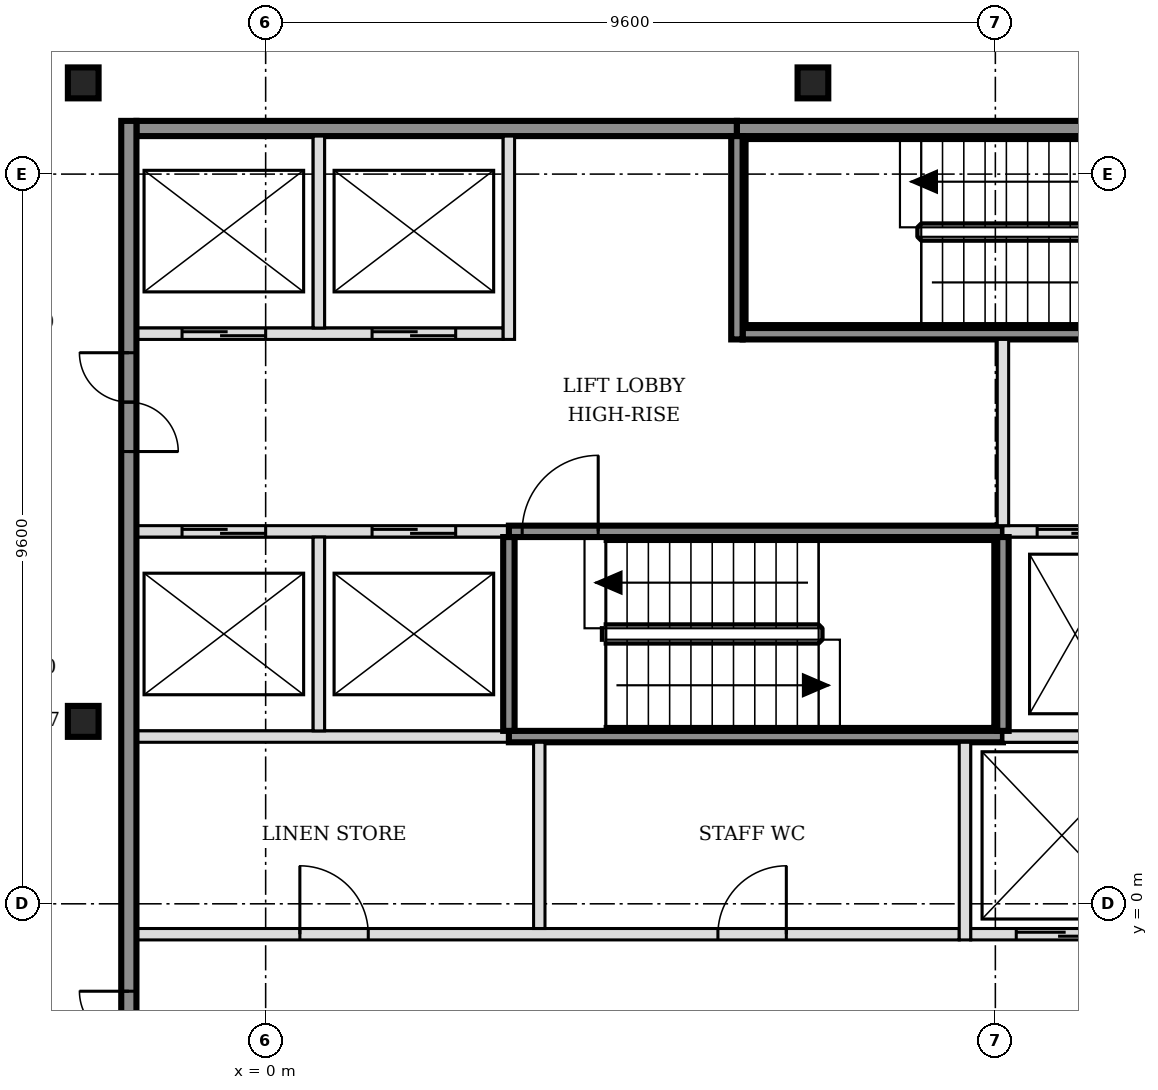
"""IFC4 building model, lengths in metres.
Left out: names, types, materials, properties, quantities, classifications, styles, units other than length and angle.
Written with IfcOpenShell. Run it as: python <this file> out.ifc"""

import sys

from ifc_helpers import new_model, si_unit, direction, frame, frame_2d, origin, origin_2d, place, context, subcontext, project, spatial, rectangle, i_section, extrude, element, fill, save


model = new_model("IFC4")
c1 = context("Model", 3, precision=1e-05, world=origin(), true_north=direction((0.0, 1.0)))
c2 = subcontext(c1, "Body", "Model", "MODEL_VIEW")
j1 = project(units=[si_unit("LENGTHUNIT", "METRE"), si_unit("PLANEANGLEUNIT", "RADIAN")], contexts=[c1])
p1 = place(None, origin())
s1 = spatial("IfcSite", under=j1, at=p1, CompositionType="ELEMENT")
p2 = place(p1, origin())
s2 = spatial("IfcBuilding", under=s1, at=p2, CompositionType="ELEMENT")
p3 = place(p2, frame((0.0, 0.0, 225.0)))
s3 = spatial("IfcBuildingStorey", under=s2, at=p3, CompositionType="ELEMENT", Elevation=225.0)
for number, where, z_axis, x_axis in (
    (1, (-2.4, 2.4, -0.15), (0.0, 0.0, 1.0), (1.0, 0.0, 0.0)),
    (2, (-2.4, 10.8, -0.15), (0.0, 0.0, 1.0), (1.0, 0.0, 0.0)),
    (3, (7.2, 10.8, -0.15), (0.0, 0.0, 1.0), (1.0, 0.0, 0.0)),
):
    element("IfcColumn", number, at=place(p3, frame(where, z_axis=z_axis, x_axis=x_axis)), inside=s3, PredefinedType="COLUMN", context=c2, shape_type="SweptSolid", body=[
        extrude(i_section(OverallWidth=0.404, OverallDepth=0.407, WebThickness=0.027, FlangeThickness=0.044, FilletRadius=0.015, at=origin_2d()), origin(), (0.0, 0.0, 1.0), 3.6),
    ])
p4 = place(p3, frame((-1.7, -0.4, 0.0), z_axis=(0.0, 0.0, 1.0), x_axis=(1.0, 0.0, 0.0)))
e4 = element("IfcWall", 4, at=p4, inside=s3, PredefinedType="PARTITIONING", context=c2, shape_type="SweptSolid", body=[
    extrude(rectangle(XDim=10.825, YDim=0.15, at=frame_2d((5.413, 0.0))), origin(), (0.0, 0.0, 1.0), 3.45),
])
p5 = place(p4, frame((2.15, 0.0, 0.0)))
e5 = element("IfcOpeningElement", 5, at=p5, cuts=e4, PredefinedType="OPENING", context=c2, shape_type="SweptSolid", body=[
    extrude(rectangle(XDim=0.9, YDim=2.1, at=frame_2d((0.45, 1.05))), frame((0.0, 0.085, 0.0), z_axis=(0.0, -1.0, 0.0), x_axis=(1.0, 0.0, 0.0)), (0.0, 0.0, 1.0), 0.17),
])
p6 = place(p4, frame((7.65, 0.0, 0.0)))
e6 = element("IfcOpeningElement", 6, at=p6, cuts=e4, PredefinedType="OPENING", context=c2, shape_type="SweptSolid", body=[
    extrude(rectangle(XDim=0.9, YDim=2.1, at=frame_2d((0.45, 1.05))), frame((0.0, 0.085, 0.0), z_axis=(0.0, -1.0, 0.0), x_axis=(1.0, 0.0, 0.0)), (0.0, 0.0, 1.0), 0.17),
])
p7 = place(p3, frame((9.275, -0.4, 0.0), z_axis=(0.0, 0.0, 1.0), x_axis=(1.0, 0.0, 0.0)))
e7 = element("IfcWall", 7, at=p7, inside=s3, PredefinedType="SOLIDWALL", context=c2, shape_type="SweptSolid", body=[
    extrude(rectangle(XDim=4.95, YDim=0.15, at=frame_2d((2.475, 0.0))), origin(), (0.0, 0.0, 1.0), 3.45),
])
p8 = place(p7, frame((0.6, 0.0, 0.0)))
e8 = element("IfcOpeningElement", 8, at=p8, cuts=e7, PredefinedType="OPENING", context=c2, shape_type="SweptSolid", body=[
    extrude(rectangle(XDim=1.2, YDim=2.1, at=frame_2d((0.6, 1.05))), frame((0.0, 0.085, 0.0), z_axis=(0.0, -1.0, 0.0), x_axis=(1.0, 0.0, 0.0)), (0.0, 0.0, 1.0), 0.17),
])
p9 = place(p7, frame((3.15, 0.0, 0.0)))
e9 = element("IfcOpeningElement", 9, at=p9, cuts=e7, PredefinedType="OPENING", context=c2, shape_type="SweptSolid", body=[
    extrude(rectangle(XDim=1.2, YDim=2.1, at=frame_2d((0.6, 1.05))), frame((0.0, 0.085, 0.0), z_axis=(0.0, -1.0, 0.0), x_axis=(1.0, 0.0, 0.0)), (0.0, 0.0, 1.0), 0.17),
])
p10 = place(p3, frame((-1.7, 2.2, 0.0), z_axis=(0.0, 0.0, 1.0), x_axis=(1.0, 0.0, 0.0)))
e10 = element("IfcWall", 10, at=p10, inside=s3, PredefinedType="SOLIDWALL", context=c2, shape_type="SweptSolid", body=[
    extrude(rectangle(XDim=4.9, YDim=0.15, at=frame_2d((2.45, 0.0))), origin(), (0.0, 0.0, 1.0), 3.45),
])
p11 = place(p3, frame((3.2, 2.2, 0.0), z_axis=(0.0, 0.0, 1.0), x_axis=(1.0, 0.0, 0.0)))
e11 = element("IfcWall", 11, at=p11, inside=s3, PredefinedType="SOLIDWALL", context=c2, shape_type="SweptSolid", body=[
    extrude(rectangle(XDim=6.5, YDim=0.15, at=frame_2d((3.25, 0.0))), origin(), (0.0, 0.0, 1.0), 3.45),
])
p12 = place(p3, frame((9.7, 2.2, 0.0), z_axis=(0.0, 0.0, 1.0), x_axis=(1.0, 0.0, 0.0)))
e12 = element("IfcWall", 12, at=p12, inside=s3, PredefinedType="SOLIDWALL", context=c2, shape_type="SweptSolid", body=[
    extrude(rectangle(XDim=4.525, YDim=0.15, at=frame_2d((2.263, 0.0))), origin(), (0.0, 0.0, 1.0), 3.45),
])
p13 = place(p3, frame((-1.7, 4.9, 0.0), z_axis=(0.0, 0.0, 1.0), x_axis=(1.0, 0.0, 0.0)))
e13 = element("IfcWall", 13, at=p13, inside=s3, PredefinedType="SOLIDWALL", context=c2, shape_type="SweptSolid", body=[
    extrude(rectangle(XDim=4.9, YDim=0.15, at=frame_2d((2.45, 0.0))), origin(), (0.0, 0.0, 1.0), 3.45),
])
p14 = place(p13, frame((0.6, 0.0, 0.0)))
e14 = element("IfcOpeningElement", 14, at=p14, cuts=e13, PredefinedType="OPENING", context=c2, shape_type="SweptSolid", body=[
    extrude(rectangle(XDim=1.1, YDim=2.1, at=frame_2d((0.55, 1.05))), frame((0.0, 0.085, 0.0), z_axis=(0.0, -1.0, 0.0), x_axis=(1.0, 0.0, 0.0)), (0.0, 0.0, 1.0), 0.17),
])
p15 = place(p13, frame((3.1, 0.0, 0.0)))
e15 = element("IfcOpeningElement", 15, at=p15, cuts=e13, PredefinedType="OPENING", context=c2, shape_type="SweptSolid", body=[
    extrude(rectangle(XDim=1.1, YDim=2.1, at=frame_2d((0.55, 1.05))), frame((0.0, 0.085, 0.0), z_axis=(0.0, -1.0, 0.0), x_axis=(1.0, 0.0, 0.0)), (0.0, 0.0, 1.0), 0.17),
])
p16 = place(p3, frame((3.2, 4.9, 0.0), z_axis=(0.0, 0.0, 1.0), x_axis=(1.0, 0.0, 0.0)))
e16 = element("IfcWall", 16, at=p16, inside=s3, PredefinedType="SOLIDWALL", context=c2, shape_type="SweptSolid", body=[
    extrude(rectangle(XDim=6.5, YDim=0.15, at=frame_2d((3.25, 0.0))), origin(), (0.0, 0.0, 1.0), 3.45),
])
p17 = place(p16, frame((0.175, 0.0, 0.0)))
e17 = element("IfcOpeningElement", 17, at=p17, cuts=e16, PredefinedType="OPENING", context=c2, shape_type="SweptSolid", body=[
    extrude(rectangle(XDim=1.0, YDim=2.1, at=frame_2d((0.5, 1.05))), frame((0.0, 0.085, 0.0), z_axis=(0.0, -1.0, 0.0), x_axis=(1.0, 0.0, 0.0)), (0.0, 0.0, 1.0), 0.17),
])
p18 = place(p3, frame((9.7, 4.9, 0.0), z_axis=(0.0, 0.0, 1.0), x_axis=(1.0, 0.0, 0.0)))
e18 = element("IfcWall", 18, at=p18, inside=s3, PredefinedType="SOLIDWALL", context=c2, shape_type="SweptSolid", body=[
    extrude(rectangle(XDim=6.4, YDim=0.15, at=frame_2d((3.2, 0.0))), origin(), (0.0, 0.0, 1.0), 3.45),
])
p19 = place(p18, frame((0.45, 0.0, 0.0)))
e19 = element("IfcOpeningElement", 19, at=p19, cuts=e18, PredefinedType="OPENING", context=c2, shape_type="SweptSolid", body=[
    extrude(rectangle(XDim=1.0, YDim=2.1, at=frame_2d((0.5, 1.05))), frame((0.0, 0.085, 0.0), z_axis=(0.0, -1.0, 0.0), x_axis=(1.0, 0.0, 0.0)), (0.0, 0.0, 1.0), 0.17),
])
p20 = place(p18, frame((2.35, 0.0, 0.0)))
e20 = element("IfcOpeningElement", 20, at=p20, cuts=e18, PredefinedType="OPENING", context=c2, shape_type="SweptSolid", body=[
    extrude(rectangle(XDim=1.0, YDim=2.1, at=frame_2d((0.5, 1.05))), frame((0.0, 0.085, 0.0), z_axis=(0.0, -1.0, 0.0), x_axis=(1.0, 0.0, 0.0)), (0.0, 0.0, 1.0), 0.17),
])
p21 = place(p18, frame((4.7, 0.0, 0.0)))
e21 = element("IfcOpeningElement", 21, at=p21, cuts=e18, PredefinedType="OPENING", context=c2, shape_type="SweptSolid", body=[
    extrude(rectangle(XDim=0.9, YDim=2.1, at=frame_2d((0.45, 1.05))), frame((0.0, 0.085, 0.0), z_axis=(0.0, -1.0, 0.0), x_axis=(1.0, 0.0, 0.0)), (0.0, 0.0, 1.0), 0.17),
])
p22 = place(p3, frame((-1.7, 7.5, 0.0), z_axis=(0.0, 0.0, 1.0), x_axis=(1.0, 0.0, 0.0)))
e22 = element("IfcWall", 22, at=p22, inside=s3, PredefinedType="SOLIDWALL", context=c2, shape_type="SweptSolid", body=[
    extrude(rectangle(XDim=4.825, YDim=0.15, at=frame_2d((2.413, 0.0))), origin(), (0.0, 0.0, 1.0), 3.45),
])
p23 = place(p22, frame((0.6, 0.0, 0.0)))
e23 = element("IfcOpeningElement", 23, at=p23, cuts=e22, PredefinedType="OPENING", context=c2, shape_type="SweptSolid", body=[
    extrude(rectangle(XDim=1.1, YDim=2.1, at=frame_2d((0.55, 1.05))), frame((0.0, 0.085, 0.0), z_axis=(0.0, -1.0, 0.0), x_axis=(1.0, 0.0, 0.0)), (0.0, 0.0, 1.0), 0.17),
])
p24 = place(p22, frame((3.1, 0.0, 0.0)))
e24 = element("IfcOpeningElement", 24, at=p24, cuts=e22, PredefinedType="OPENING", context=c2, shape_type="SweptSolid", body=[
    extrude(rectangle(XDim=1.1, YDim=2.1, at=frame_2d((0.55, 1.05))), frame((0.0, 0.085, 0.0), z_axis=(0.0, -1.0, 0.0), x_axis=(1.0, 0.0, 0.0)), (0.0, 0.0, 1.0), 0.17),
])
p25 = place(p3, frame((6.275, 7.5, 0.0), z_axis=(0.0, 0.0, 1.0), x_axis=(1.0, 0.0, 0.0)))
e25 = element("IfcWall", 25, at=p25, inside=s3, PredefinedType="SOLIDWALL", context=c2, shape_type="SweptSolid", body=[
    extrude(rectangle(XDim=6.425, YDim=0.15, at=frame_2d((3.212, 0.0))), origin(), (0.0, 0.0, 1.0), 3.45),
])
p26 = place(p25, frame((5.225, 0.0, 0.0)))
e26 = element("IfcOpeningElement", 26, at=p26, cuts=e25, PredefinedType="OPENING", context=c2, shape_type="SweptSolid", body=[
    extrude(rectangle(XDim=1.0, YDim=2.1, at=frame_2d((0.5, 1.05))), frame((0.0, 0.085, 0.0), z_axis=(0.0, -1.0, 0.0), x_axis=(1.0, 0.0, 0.0)), (0.0, 0.0, 1.0), 0.17),
])
p27 = place(p3, frame((-1.7, 10.2, 0.0), z_axis=(0.0, 0.0, 1.0), x_axis=(1.0, 0.0, 0.0)))
e27 = element("IfcWall", 27, at=p27, inside=s3, PredefinedType="SOLIDWALL", context=c2, shape_type="SweptSolid", body=[
    extrude(rectangle(XDim=7.9, YDim=0.2, at=frame_2d((3.95, 0.0))), origin(), (0.0, 0.0, 1.0), 3.45),
])
p28 = place(p3, frame((6.2, 10.2, 0.0), z_axis=(0.0, 0.0, 1.0), x_axis=(1.0, 0.0, 0.0)))
e28 = element("IfcWall", 28, at=p28, inside=s3, PredefinedType="SOLIDWALL", context=c2, shape_type="SweptSolid", body=[
    extrude(rectangle(XDim=6.5, YDim=0.2, at=frame_2d((3.25, 0.0))), origin(), (0.0, 0.0, 1.0), 3.45),
])
p29 = place(p3, frame((-1.8, -5.5, 0.0), z_axis=(0.0, 0.0, 1.0), x_axis=(0.0, 1.0, 0.0)))
e29 = element("IfcWall", 29, at=p29, inside=s3, PredefinedType="SOLIDWALL", context=c2, shape_type="SweptSolid", body=[
    extrude(rectangle(XDim=15.8, YDim=0.2, at=frame_2d((7.9, 0.0))), origin(), (0.0, 0.0, 1.0), 3.45),
])
p30 = place(p29, frame((3.05, 0.0, 0.0)))
e30 = element("IfcOpeningElement", 30, at=p30, cuts=e29, PredefinedType="OPENING", context=c2, shape_type="SweptSolid", body=[
    extrude(rectangle(XDim=1.3, YDim=2.1, at=frame_2d((0.65, 1.05))), frame((0.0, 0.11, 0.0), z_axis=(0.0, -1.0, 0.0), x_axis=(1.0, 0.0, 0.0)), (0.0, 0.0, 1.0), 0.22),
])
p31 = place(p29, frame((11.45, 0.0, 0.0)))
e31 = element("IfcOpeningElement", 31, at=p31, cuts=e29, PredefinedType="OPENING", context=c2, shape_type="SweptSolid", body=[
    extrude(rectangle(XDim=1.3, YDim=2.1, at=frame_2d((0.65, 1.05))), frame((0.0, 0.11, 0.0), z_axis=(0.0, -1.0, 0.0), x_axis=(1.0, 0.0, 0.0)), (0.0, 0.0, 1.0), 0.22),
])
p32 = place(p3, frame((0.7, 2.275, 0.0), z_axis=(0.0, 0.0, 1.0), x_axis=(0.0, 1.0, 0.0)))
e32 = element("IfcWall", 32, at=p32, inside=s3, PredefinedType="SOLIDWALL", context=c2, shape_type="SweptSolid", body=[
    extrude(rectangle(XDim=2.55, YDim=0.15, at=frame_2d((1.275, 0.0))), origin(), (0.0, 0.0, 1.0), 3.45),
])
p33 = place(p3, frame((0.7, 7.575, 0.0), z_axis=(0.0, 0.0, 1.0), x_axis=(0.0, 1.0, 0.0)))
e33 = element("IfcWall", 33, at=p33, inside=s3, PredefinedType="SOLIDWALL", context=c2, shape_type="SweptSolid", body=[
    extrude(rectangle(XDim=2.525, YDim=0.15, at=frame_2d((1.263, 0.0))), origin(), (0.0, 0.0, 1.0), 3.45),
])
p34 = place(p3, frame((3.2, 2.275, 0.0), z_axis=(0.0, 0.0, 1.0), x_axis=(0.0, 1.0, 0.0)))
e34 = element("IfcWall", 34, at=p34, inside=s3, PredefinedType="SOLIDWALL", context=c2, shape_type="SweptSolid", body=[
    extrude(rectangle(XDim=2.55, YDim=0.15, at=frame_2d((1.275, 0.0))), origin(), (0.0, 0.0, 1.0), 3.45),
])
p35 = place(p3, frame((3.2, 7.425, 0.0), z_axis=(0.0, 0.0, 1.0), x_axis=(0.0, 1.0, 0.0)))
e35 = element("IfcWall", 35, at=p35, inside=s3, PredefinedType="SOLIDWALL", context=c2, shape_type="SweptSolid", body=[
    extrude(rectangle(XDim=2.675, YDim=0.15, at=frame_2d((1.337, 0.0))), origin(), (0.0, 0.0, 1.0), 3.45),
])
p36 = place(p3, frame((3.6, -0.325, 0.0), z_axis=(0.0, 0.0, 1.0), x_axis=(0.0, 1.0, 0.0)))
e36 = element("IfcWall", 36, at=p36, inside=s3, PredefinedType="PARTITIONING", context=c2, shape_type="SweptSolid", body=[
    extrude(rectangle(XDim=2.45, YDim=0.15, at=frame_2d((1.225, 0.0))), origin(), (0.0, 0.0, 1.0), 3.45),
])
p37 = place(p3, frame((6.2, 7.425, 0.0), z_axis=(0.0, 0.0, 1.0), x_axis=(0.0, 1.0, 0.0)))
e37 = element("IfcWall", 37, at=p37, inside=s3, PredefinedType="SOLIDWALL", context=c2, shape_type="SweptSolid", body=[
    extrude(rectangle(XDim=2.675, YDim=0.15, at=frame_2d((1.337, 0.0))), origin(), (0.0, 0.0, 1.0), 3.45),
])
p38 = place(p3, frame((9.2, -0.475, 0.0), z_axis=(0.0, 0.0, 1.0), x_axis=(0.0, 1.0, 0.0)))
e38 = element("IfcWall", 38, at=p38, inside=s3, PredefinedType="SOLIDWALL", context=c2, shape_type="SweptSolid", body=[
    extrude(rectangle(XDim=2.6, YDim=0.15, at=frame_2d((1.3, 0.0))), origin(), (0.0, 0.0, 1.0), 3.45),
])
p39 = place(p3, frame((9.7, 2.275, 0.0), z_axis=(0.0, 0.0, 1.0), x_axis=(0.0, 1.0, 0.0)))
e39 = element("IfcWall", 39, at=p39, inside=s3, PredefinedType="SOLIDWALL", context=c2, shape_type="SweptSolid", body=[
    extrude(rectangle(XDim=2.55, YDim=0.15, at=frame_2d((1.275, 0.0))), origin(), (0.0, 0.0, 1.0), 3.45),
])
p40 = place(p3, frame((9.7, 4.975, 0.0), z_axis=(0.0, 0.0, 1.0), x_axis=(0.0, 1.0, 0.0)))
e40 = element("IfcWall", 40, at=p40, inside=s3, PredefinedType="SOLIDWALL", context=c2, shape_type="SweptSolid", body=[
    extrude(rectangle(XDim=2.45, YDim=0.15, at=frame_2d((1.225, 0.0))), origin(), (0.0, 0.0, 1.0), 3.45),
])
p41 = place(p8, origin())
e41 = element("IfcDoor", 41, at=p41, inside=s3, OperationType="DOUBLE_DOOR_SLIDING", PredefinedType="DOOR", context=c2, shape_type="SweptSolid", body=[
    extrude(rectangle(XDim=1.2, YDim=2.1, at=frame_2d((0.6, 1.05))), frame((0.0, 0.025, 0.0), z_axis=(0.0, -1.0, 0.0), x_axis=(1.0, 0.0, 0.0)), (0.0, 0.0, 1.0), 0.05),
])
fill(e8, e41)
p42 = place(p14, origin())
e42 = element("IfcDoor", 42, at=p42, inside=s3, OperationType="DOUBLE_DOOR_SLIDING", PredefinedType="DOOR", context=c2, shape_type="SweptSolid", body=[
    extrude(rectangle(XDim=1.1, YDim=2.1, at=frame_2d((0.55, 1.05))), frame((0.0, 0.025, 0.0), z_axis=(0.0, -1.0, 0.0), x_axis=(1.0, 0.0, 0.0)), (0.0, 0.0, 1.0), 0.05),
])
fill(e14, e42)
p43 = place(p15, origin())
e43 = element("IfcDoor", 43, at=p43, inside=s3, OperationType="DOUBLE_DOOR_SLIDING", PredefinedType="DOOR", context=c2, shape_type="SweptSolid", body=[
    extrude(rectangle(XDim=1.1, YDim=2.1, at=frame_2d((0.55, 1.05))), frame((0.0, 0.025, 0.0), z_axis=(0.0, -1.0, 0.0), x_axis=(1.0, 0.0, 0.0)), (0.0, 0.0, 1.0), 0.05),
])
fill(e15, e43)
p44 = place(p23, origin())
e44 = element("IfcDoor", 44, at=p44, inside=s3, OperationType="DOUBLE_DOOR_SLIDING", PredefinedType="DOOR", context=c2, shape_type="SweptSolid", body=[
    extrude(rectangle(XDim=1.1, YDim=2.1, at=frame_2d((0.55, 1.05))), frame((0.0, 0.025, 0.0), z_axis=(0.0, -1.0, 0.0), x_axis=(1.0, 0.0, 0.0)), (0.0, 0.0, 1.0), 0.05),
])
fill(e23, e44)
p45 = place(p24, origin())
e45 = element("IfcDoor", 45, at=p45, inside=s3, OperationType="DOUBLE_DOOR_SLIDING", PredefinedType="DOOR", context=c2, shape_type="SweptSolid", body=[
    extrude(rectangle(XDim=1.1, YDim=2.1, at=frame_2d((0.55, 1.05))), frame((0.0, 0.025, 0.0), z_axis=(0.0, -1.0, 0.0), x_axis=(1.0, 0.0, 0.0)), (0.0, 0.0, 1.0), 0.05),
])
fill(e24, e45)
p46 = place(p19, origin())
e46 = element("IfcDoor", 46, at=p46, inside=s3, OperationType="DOUBLE_DOOR_SLIDING", PredefinedType="DOOR", context=c2, shape_type="SweptSolid", body=[
    extrude(rectangle(XDim=1.0, YDim=2.1, at=frame_2d((0.5, 1.05))), frame((0.0, 0.025, 0.0), z_axis=(0.0, -1.0, 0.0), x_axis=(1.0, 0.0, 0.0)), (0.0, 0.0, 1.0), 0.05),
])
fill(e19, e46)
p47 = place(p17, origin())
e47 = element("IfcDoor", 47, at=p47, inside=s3, OperationType="SINGLE_SWING_RIGHT", PredefinedType="DOOR", context=c2, shape_type="SweptSolid", body=[
    extrude(rectangle(XDim=1.0, YDim=2.1, at=frame_2d((0.5, 1.05))), frame((0.0, 0.025, 0.0), z_axis=(0.0, -1.0, 0.0), x_axis=(1.0, 0.0, 0.0)), (0.0, 0.0, 1.0), 0.05),
])
fill(e17, e47)
p48 = place(p30, origin())
e48 = element("IfcDoor", 48, at=p48, inside=s3, OperationType="DOUBLE_DOOR_SINGLE_SWING", PredefinedType="DOOR", context=c2, shape_type="SweptSolid", body=[
    extrude(rectangle(XDim=1.3, YDim=2.1, at=frame_2d((0.65, 1.05))), frame((0.0, 0.025, 0.0), z_axis=(0.0, -1.0, 0.0), x_axis=(1.0, 0.0, 0.0)), (0.0, 0.0, 1.0), 0.05),
])
fill(e30, e48)
p49 = place(p31, origin())
e49 = element("IfcDoor", 49, at=p49, inside=s3, OperationType="DOUBLE_DOOR_SINGLE_SWING", PredefinedType="DOOR", context=c2, shape_type="SweptSolid", body=[
    extrude(rectangle(XDim=1.3, YDim=2.1, at=frame_2d((0.65, 1.05))), frame((0.0, 0.025, 0.0), z_axis=(0.0, -1.0, 0.0), x_axis=(1.0, 0.0, 0.0)), (0.0, 0.0, 1.0), 0.05),
])
fill(e31, e49)
p50 = place(p5, origin())
e50 = element("IfcDoor", 50, at=p50, inside=s3, OperationType="SINGLE_SWING_LEFT", PredefinedType="DOOR", context=c2, shape_type="SweptSolid", body=[
    extrude(rectangle(XDim=0.9, YDim=2.1, at=frame_2d((0.45, 1.05))), frame((0.0, 0.025, 0.0), z_axis=(0.0, -1.0, 0.0), x_axis=(1.0, 0.0, 0.0)), (0.0, 0.0, 1.0), 0.05),
])
fill(e5, e50)
p51 = place(p6, origin())
e51 = element("IfcDoor", 51, at=p51, inside=s3, OperationType="SINGLE_SWING_RIGHT", PredefinedType="DOOR", context=c2, shape_type="SweptSolid", body=[
    extrude(rectangle(XDim=0.9, YDim=2.1, at=frame_2d((0.45, 1.05))), frame((0.0, 0.025, 0.0), z_axis=(0.0, -1.0, 0.0), x_axis=(1.0, 0.0, 0.0)), (0.0, 0.0, 1.0), 0.05),
])
fill(e6, e51)
save(model, sys.argv[1])
